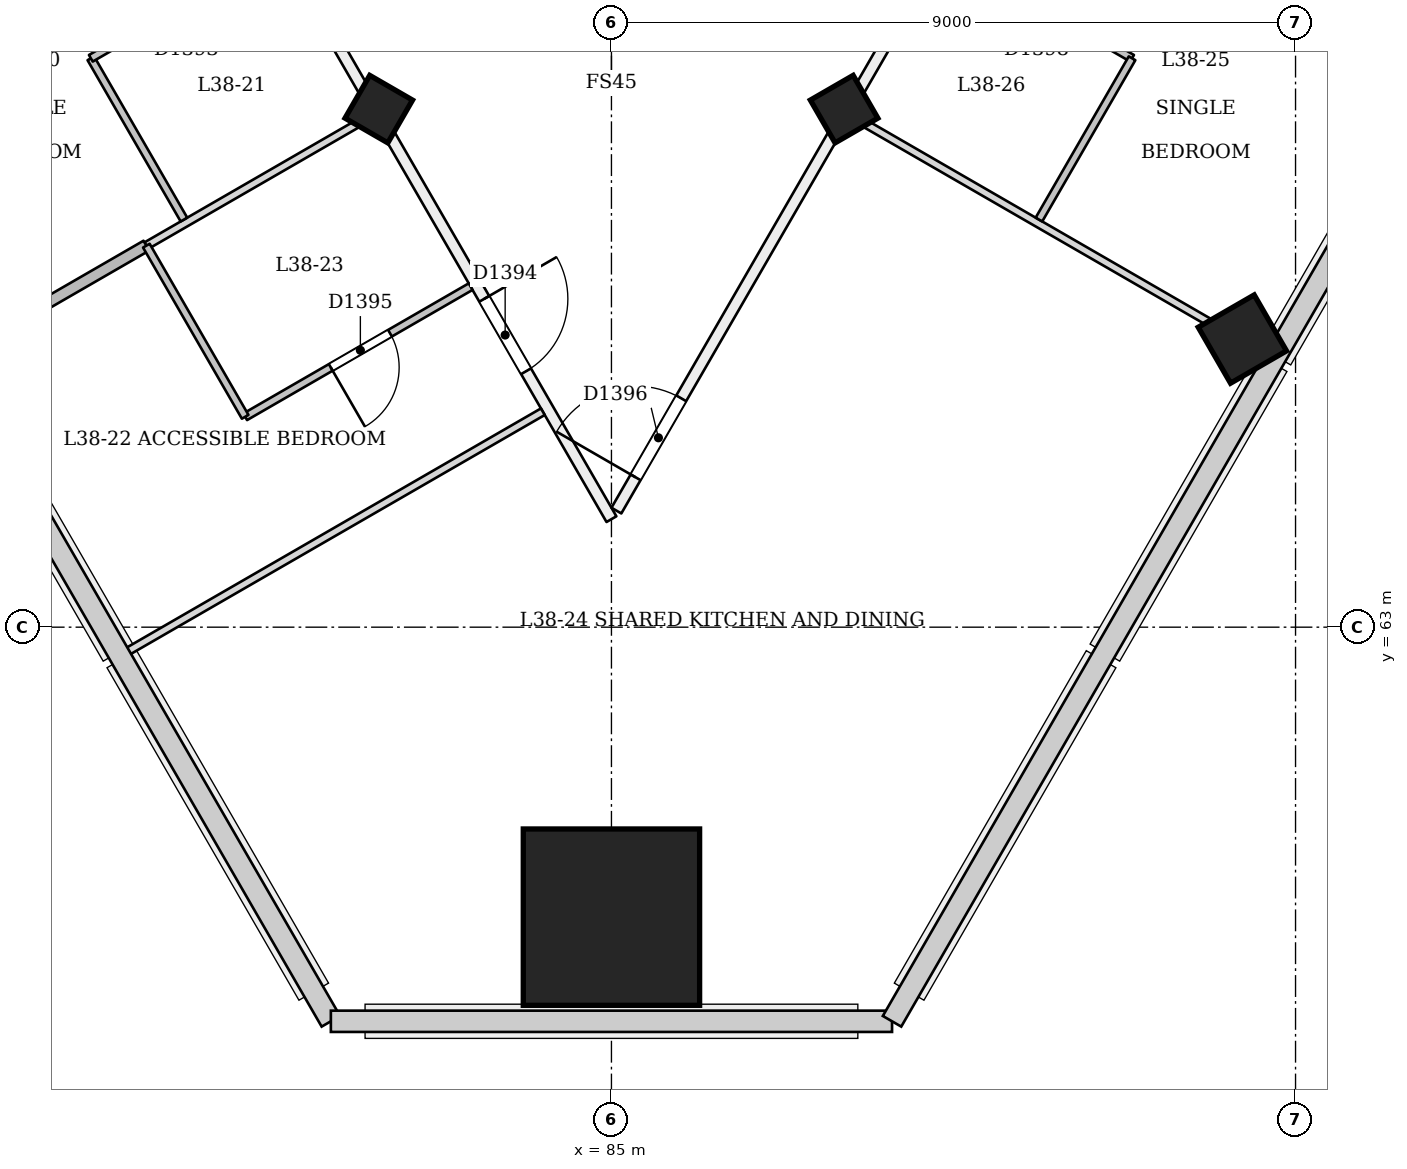
"""IFC4 building model, lengths in metres.
Left out: names, types, materials, properties, quantities, classifications, styles, units other than length and angle.
Written with IfcOpenShell. Run it as: python <this file> out.ifc"""

import sys

from ifc_helpers import new_model, si_unit, direction, frame, frame_2d, origin, origin_2d, place, context, subcontext, project, spatial, rectangle, extrude, element, fill, save


model = new_model("IFC4")
c1 = context("Model", 3, precision=1e-05, world=origin(), true_north=direction((0.0, 1.0)))
c2 = subcontext(c1, "Body", "Model", "MODEL_VIEW")
j1 = project(units=[si_unit("LENGTHUNIT", "METRE"), si_unit("PLANEANGLEUNIT", "RADIAN")], contexts=[c1])
p1 = place(None, origin())
s1 = spatial("IfcSite", under=j1, at=p1, CompositionType="ELEMENT")
p2 = place(p1, origin())
s2 = spatial("IfcBuilding", under=s1, at=p2, CompositionType="ELEMENT")
p3 = place(p2, frame((0.0, 0.0, 149.4)))
s3 = spatial("IfcBuildingStorey", under=s2, at=p3, CompositionType="ELEMENT", Elevation=149.4)
for number, where, z_axis, x_axis in (
    (1, (81.912, 69.769, -0.02), (0.022, 0.038, 0.999), (-0.866, -0.499, 0.038)),
    (2, (88.088, 69.769, -0.02), (-0.022, 0.038, 0.999), (-0.5, -0.866, 0.022)),
):
    element("IfcColumn", number, at=place(p3, frame(where, z_axis=z_axis, x_axis=x_axis)), inside=s3, PredefinedType="COLUMN", context=c2, shape_type="SweptSolid", body=[
        extrude(rectangle(XDim=0.65, YDim=0.65, at=origin_2d()), origin(), (0.0, 0.0, 1.0), 3.604),
    ])
p4 = place(p3, frame((85.0, 59.115, 0.0), z_axis=(0.0, 0.058356907999, 0.998295783467), x_axis=(-1.0, 0.0, 0.0)))
e3 = element("IfcColumn", 3, at=p4, inside=s3, PredefinedType="COLUMN", context=c2, shape_type="SweptSolid", body=[
    extrude(rectangle(XDim=2.32, YDim=2.32, at=origin_2d()), origin(), (0.0, 0.0, 1.0), 3.606),
])
p5 = place(p3, frame((93.328, 66.743, -0.026), z_axis=(-0.022155133694, 0.038483534979, 0.999013597298), x_axis=(-0.5013148803, -0.864980017854, 0.022202691372)))
e4 = element("IfcColumn", 4, at=p5, inside=s3, PredefinedType="COLUMN", context=c2, shape_type="SweptSolid", body=[
    extrude(rectangle(XDim=0.85, YDim=0.85, at=origin_2d()), origin(), (0.0, 0.0, 1.0), 3.604),
])
p6 = place(p3, frame((65.324, 98.5, 0.0), z_axis=(0.0, 0.0, 1.0), x_axis=(0.500001898363, -0.866024307761, 0.0)))
e5 = element("IfcWall", 5, at=p6, inside=s3, PredefinedType="PARTITIONING", context=c2, shape_type="SweptSolid", body=[
    extrude(rectangle(XDim=39.351, YDim=0.15, at=frame_2d((19.675, 0.0))), origin(), (0.0, 0.0, 1.0), 2.75),
])
p7 = place(p6, frame((0.2, 0.0, 0.0)))
e6 = element("IfcOpeningElement", 6, at=p7, cuts=e5, PredefinedType="OPENING", context=c2, shape_type="SweptSolid", body=[
    extrude(rectangle(XDim=1.2, YDim=2.1, at=frame_2d((0.6, 1.05))), frame((0.0, 0.085, 0.0), z_axis=(0.0, -1.0, 0.0), x_axis=(1.0, 0.0, 0.0)), (0.0, 0.0, 1.0), 0.171),
])
p8 = place(p6, frame((3.425, 0.0, 0.0)))
e7 = element("IfcOpeningElement", 7, at=p8, cuts=e5, PredefinedType="OPENING", context=c2, shape_type="SweptSolid", body=[
    extrude(rectangle(XDim=1.0, YDim=2.1, at=frame_2d((0.5, 1.05))), frame((0.0, 0.085, 0.0), z_axis=(0.0, -1.0, 0.0), x_axis=(1.0, 0.0, 0.0)), (0.0, 0.0, 1.0), 0.171),
])
p9 = place(p6, frame((9.004, 0.0, 0.0)))
e8 = element("IfcOpeningElement", 8, at=p9, cuts=e5, PredefinedType="OPENING", context=c2, shape_type="SweptSolid", body=[
    extrude(rectangle(XDim=1.1, YDim=2.1, at=frame_2d((0.55, 1.05))), frame((0.0, 0.085, 0.0), z_axis=(0.0, -1.0, 0.0), x_axis=(1.0, 0.0, 0.0)), (0.0, 0.0, 1.0), 0.171),
])
p10 = place(p6, frame((11.396, 0.0, 0.0)))
e9 = element("IfcOpeningElement", 9, at=p10, cuts=e5, PredefinedType="OPENING", context=c2, shape_type="SweptSolid", body=[
    extrude(rectangle(XDim=1.0, YDim=2.1, at=frame_2d((0.5, 1.05))), frame((0.0, 0.085, 0.0), z_axis=(0.0, -1.0, 0.0), x_axis=(1.0, 0.0, 0.0)), (0.0, 0.0, 1.0), 0.171),
])
p11 = place(p6, frame((17.955, 0.0, 0.0)))
e10 = element("IfcOpeningElement", 10, at=p11, cuts=e5, PredefinedType="OPENING", context=c2, shape_type="SweptSolid", body=[
    extrude(rectangle(XDim=1.0, YDim=2.1, at=frame_2d((0.5, 1.05))), frame((0.0, 0.085, 0.0), z_axis=(0.0, -1.0, 0.0), x_axis=(1.0, 0.0, 0.0)), (0.0, 0.0, 1.0), 0.171),
])
p12 = place(p6, frame((20.396, 0.0, 0.0)))
e11 = element("IfcOpeningElement", 11, at=p12, cuts=e5, PredefinedType="OPENING", context=c2, shape_type="SweptSolid", body=[
    extrude(rectangle(XDim=1.0, YDim=2.1, at=frame_2d((0.5, 1.05))), frame((0.0, 0.085, 0.0), z_axis=(0.0, -1.0, 0.0), x_axis=(1.0, 0.0, 0.0)), (0.0, 0.0, 1.0), 0.171),
])
p13 = place(p6, frame((26.955, 0.0, 0.0)))
e12 = element("IfcOpeningElement", 12, at=p13, cuts=e5, PredefinedType="OPENING", context=c2, shape_type="SweptSolid", body=[
    extrude(rectangle(XDim=1.0, YDim=2.1, at=frame_2d((0.5, 1.05))), frame((0.0, 0.085, 0.0), z_axis=(0.0, -1.0, 0.0), x_axis=(1.0, 0.0, 0.0)), (0.0, 0.0, 1.0), 0.171),
])
p14 = place(p6, frame((29.396, 0.0, 0.0)))
e13 = element("IfcOpeningElement", 13, at=p14, cuts=e5, PredefinedType="OPENING", context=c2, shape_type="SweptSolid", body=[
    extrude(rectangle(XDim=1.0, YDim=2.1, at=frame_2d((0.5, 1.05))), frame((0.0, 0.085, 0.0), z_axis=(0.0, -1.0, 0.0), x_axis=(1.0, 0.0, 0.0)), (0.0, 0.0, 1.0), 0.171),
])
p15 = place(p6, frame((36.004, 0.0, 0.0)))
e14 = element("IfcOpeningElement", 14, at=p15, cuts=e5, PredefinedType="OPENING", context=c2, shape_type="SweptSolid", body=[
    extrude(rectangle(XDim=1.1, YDim=2.1, at=frame_2d((0.55, 1.05))), frame((0.0, 0.085, 0.0), z_axis=(0.0, -1.0, 0.0), x_axis=(1.0, 0.0, 0.0)), (0.0, 0.0, 1.0), 0.171),
])
p16 = place(p3, frame((85.065, 64.534, 0.0), z_axis=(0.0, 0.0, 1.0), x_axis=(0.500002644497, 0.866023876978, 0.0)))
e15 = element("IfcWall", 15, at=p16, inside=s3, PredefinedType="PARTITIONING", context=c2, shape_type="SweptSolid", body=[
    extrude(rectangle(XDim=39.221, YDim=0.15, at=frame_2d((19.61, 0.0))), origin(), (0.0, 0.0, 1.0), 2.75),
])
p17 = place(p16, frame((0.506, 0.0, 0.0)))
e16 = element("IfcOpeningElement", 16, at=p17, cuts=e15, PredefinedType="OPENING", context=c2, shape_type="SweptSolid", body=[
    extrude(rectangle(XDim=1.2, YDim=2.1, at=frame_2d((0.6, 1.05))), frame((0.0, 0.085, 0.0), z_axis=(0.0, -1.0, 0.0), x_axis=(1.0, 0.0, 0.0)), (0.0, 0.0, 1.0), 0.171),
])
p18 = place(p16, frame((8.825, 0.0, 0.0)))
e17 = element("IfcOpeningElement", 17, at=p18, cuts=e15, PredefinedType="OPENING", context=c2, shape_type="SweptSolid", body=[
    extrude(rectangle(XDim=1.0, YDim=2.1, at=frame_2d((0.5, 1.05))), frame((0.0, 0.085, 0.0), z_axis=(0.0, -1.0, 0.0), x_axis=(1.0, 0.0, 0.0)), (0.0, 0.0, 1.0), 0.171),
])
p19 = place(p16, frame((11.266, 0.0, 0.0)))
e18 = element("IfcOpeningElement", 18, at=p19, cuts=e15, PredefinedType="OPENING", context=c2, shape_type="SweptSolid", body=[
    extrude(rectangle(XDim=1.0, YDim=2.1, at=frame_2d((0.5, 1.05))), frame((0.0, 0.085, 0.0), z_axis=(0.0, -1.0, 0.0), x_axis=(1.0, 0.0, 0.0)), (0.0, 0.0, 1.0), 0.171),
])
p20 = place(p16, frame((17.825, 0.0, 0.0)))
e19 = element("IfcOpeningElement", 19, at=p20, cuts=e15, PredefinedType="OPENING", context=c2, shape_type="SweptSolid", body=[
    extrude(rectangle(XDim=1.0, YDim=2.1, at=frame_2d((0.5, 1.05))), frame((0.0, 0.085, 0.0), z_axis=(0.0, -1.0, 0.0), x_axis=(1.0, 0.0, 0.0)), (0.0, 0.0, 1.0), 0.171),
])
p21 = place(p16, frame((20.266, 0.0, 0.0)))
e20 = element("IfcOpeningElement", 20, at=p21, cuts=e15, PredefinedType="OPENING", context=c2, shape_type="SweptSolid", body=[
    extrude(rectangle(XDim=1.0, YDim=2.1, at=frame_2d((0.5, 1.05))), frame((0.0, 0.085, 0.0), z_axis=(0.0, -1.0, 0.0), x_axis=(1.0, 0.0, 0.0)), (0.0, 0.0, 1.0), 0.171),
])
p22 = place(p16, frame((26.825, 0.0, 0.0)))
e21 = element("IfcOpeningElement", 21, at=p22, cuts=e15, PredefinedType="OPENING", context=c2, shape_type="SweptSolid", body=[
    extrude(rectangle(XDim=1.0, YDim=2.1, at=frame_2d((0.5, 1.05))), frame((0.0, 0.085, 0.0), z_axis=(0.0, -1.0, 0.0), x_axis=(1.0, 0.0, 0.0)), (0.0, 0.0, 1.0), 0.171),
])
p23 = place(p16, frame((30.296, 0.0, 0.0)))
e22 = element("IfcOpeningElement", 22, at=p23, cuts=e15, PredefinedType="OPENING", context=c2, shape_type="SweptSolid", body=[
    extrude(rectangle(XDim=1.0, YDim=2.1, at=frame_2d((0.5, 1.05))), frame((0.0, 0.085, 0.0), z_axis=(0.0, -1.0, 0.0), x_axis=(1.0, 0.0, 0.0)), (0.0, 0.0, 1.0), 0.171),
])
p24 = place(p16, frame((35.875, 0.0, 0.0)))
e23 = element("IfcOpeningElement", 23, at=p24, cuts=e15, PredefinedType="OPENING", context=c2, shape_type="SweptSolid", body=[
    extrude(rectangle(XDim=1.1, YDim=2.1, at=frame_2d((0.55, 1.05))), frame((0.0, 0.085, 0.0), z_axis=(0.0, -1.0, 0.0), x_axis=(1.0, 0.0, 0.0)), (0.0, 0.0, 1.0), 0.171),
])
p25 = place(p16, frame((37.821, 0.0, 0.0)))
e24 = element("IfcOpeningElement", 24, at=p25, cuts=e15, PredefinedType="OPENING", context=c2, shape_type="SweptSolid", body=[
    extrude(rectangle(XDim=1.2, YDim=2.1, at=frame_2d((0.6, 1.05))), frame((0.0, 0.085, 0.0), z_axis=(0.0, -1.0, 0.0), x_axis=(1.0, 0.0, 0.0)), (0.0, 0.0, 1.0), 0.171),
])
p26 = place(p3, frame((74.102, 70.456, 0.0), z_axis=(0.0, 0.0, 1.0), x_axis=(0.866025401434, 0.500000004071, 0.0)))
e25 = element("IfcWall", 25, at=p26, inside=s3, PredefinedType="PARTITIONING", context=c2, shape_type="SweptSolid", body=[
    extrude(rectangle(XDim=6.345, YDim=0.15, at=frame_2d((3.173, 0.0))), origin(), (0.0, 0.0, 1.0), 2.65),
])
p27 = place(p3, frame((79.376, 68.363, 0.0), z_axis=(0.0, 0.0, 1.0), x_axis=(-0.499943856944, 0.866057815567, 0.0)))
e26 = element("IfcWall", 26, at=p27, inside=s3, PredefinedType="PARTITIONING", context=c2, shape_type="SweptSolid", body=[
    extrude(rectangle(XDim=2.45, YDim=0.1, at=frame_2d((1.225, 0.0))), origin(), (0.0, 0.0, 1.0), 2.75),
])
p28 = place(p3, frame((78.151, 70.484, 0.0), z_axis=(0.0, 0.0, 1.0), x_axis=(0.866048868473, 0.499959355765, 0.0)))
e27 = element("IfcWall", 27, at=p28, inside=s3, PredefinedType="PARTITIONING", context=c2, shape_type="SweptSolid", body=[
    extrude(rectangle(XDim=2.825, YDim=0.1, at=frame_2d((1.413, 0.0))), origin(), (0.0, 0.0, 1.0), 3.15),
])
p29 = place(p28, frame((1.0, 0.0, 0.0)))
e28 = element("IfcOpeningElement", 28, at=p29, cuts=e27, PredefinedType="OPENING", context=c2, shape_type="SweptSolid", body=[
    extrude(rectangle(XDim=0.9, YDim=2.1, at=frame_2d((0.45, 1.05))), frame((0.0, 0.061, 0.0), z_axis=(0.0, -1.0, 0.0), x_axis=(1.0, 0.0, 0.0)), (0.0, 0.0, 1.0), 0.121),
])
p30 = place(p3, frame((76.37, 66.569, 0.0), z_axis=(0.0, 0.0, 1.0), x_axis=(0.866032775405, 0.499987231761, 0.0)))
e29 = element("IfcWall", 29, at=p30, inside=s3, PredefinedType="PARTITIONING", context=c2, shape_type="SweptSolid", body=[
    extrude(rectangle(XDim=2.9, YDim=0.15, at=frame_2d((1.45, 0.0))), origin(), (0.0, 0.0, 1.0), 2.65),
])
p31 = place(p3, frame((78.881, 68.019, 0.0), z_axis=(0.0, 0.0, 1.0), x_axis=(0.866050272892, 0.499956922968, 0.0)))
e30 = element("IfcWall", 30, at=p31, inside=s3, PredefinedType="PARTITIONING", context=c2, shape_type="SweptSolid", body=[
    extrude(rectangle(XDim=3.425, YDim=0.1, at=frame_2d((1.712, 0.0))), origin(), (0.0, 0.0, 1.0), 2.75),
])
p32 = place(p3, frame((83.147, 67.48, 0.0), z_axis=(0.0, 0.0, 1.0), x_axis=(-0.866032454348, -0.499987787867, 0.0)))
e31 = element("IfcWall", 31, at=p32, inside=s3, PredefinedType="PARTITIONING", context=c2, shape_type="SweptSolid", body=[
    extrude(rectangle(XDim=3.425, YDim=0.1, at=frame_2d((1.712, 0.0))), origin(), (0.0, 0.0, 1.0), 3.15),
])
p33 = place(p32, frame((1.225, 0.0, 0.0)))
e32 = element("IfcOpeningElement", 32, at=p33, cuts=e31, PredefinedType="OPENING", context=c2, shape_type="SweptSolid", body=[
    extrude(rectangle(XDim=0.9, YDim=2.1, at=frame_2d((0.45, 1.05))), frame((0.0, 0.061, 0.0), z_axis=(0.0, -1.0, 0.0), x_axis=(1.0, 0.0, 0.0)), (0.0, 0.0, 1.0), 0.121),
])
p34 = place(p3, frame((80.181, 65.768, 0.0), z_axis=(0.0, 0.0, 1.0), x_axis=(-0.500006934395, 0.866021400173, 0.0)))
e33 = element("IfcWall", 33, at=p34, inside=s3, PredefinedType="PARTITIONING", context=c2, shape_type="SweptSolid", body=[
    extrude(rectangle(XDim=2.6, YDim=0.1, at=frame_2d((1.3, 0.0))), origin(), (0.0, 0.0, 1.0), 2.75),
])
p35 = place(p3, frame((78.602, 62.662, 0.0), z_axis=(0.0, 0.0, 1.0), x_axis=(0.866025401434, 0.500000004071, 0.0)))
e34 = element("IfcWall", 34, at=p35, inside=s3, PredefinedType="PARTITIONING", context=c2, shape_type="SweptSolid", body=[
    extrude(rectangle(XDim=6.345, YDim=0.1, at=frame_2d((3.173, 0.0))), origin(), (0.0, 0.0, 1.0), 2.65),
])
p36 = place(p3, frame((93.63, 66.569, 0.0), z_axis=(0.0, 0.0, 1.0), x_axis=(-0.866042250622, 0.499970819286, 0.0)))
e35 = element("IfcWall", 35, at=p36, inside=s3, PredefinedType="PARTITIONING", context=c2, shape_type="SweptSolid", body=[
    extrude(rectangle(XDim=6.325, YDim=0.1, at=frame_2d((3.163, 0.0))), origin(), (0.0, 0.0, 1.0), 2.65),
])
p37 = place(p3, frame((89.403, 71.897, 0.0), z_axis=(0.0, 0.0, 1.0), x_axis=(0.866048868473, -0.499959355765, 0.0)))
e36 = element("IfcWall", 36, at=p37, inside=s3, PredefinedType="PARTITIONING", context=c2, shape_type="SweptSolid", body=[
    extrude(rectangle(XDim=2.825, YDim=0.1, at=frame_2d((1.413, 0.0))), origin(), (0.0, 0.0, 1.0), 3.15),
])
p38 = place(p37, frame((0.925, 0.0, 0.0)))
e37 = element("IfcOpeningElement", 37, at=p38, cuts=e36, PredefinedType="OPENING", context=c2, shape_type="SweptSolid", body=[
    extrude(rectangle(XDim=0.9, YDim=2.1, at=frame_2d((0.45, 1.05))), frame((0.0, 0.061, 0.0), z_axis=(0.0, -1.0, 0.0), x_axis=(1.0, 0.0, 0.0)), (0.0, 0.0, 1.0), 0.121),
])
p39 = place(p3, frame((91.849, 70.484, 0.0), z_axis=(0.0, 0.0, 1.0), x_axis=(-0.499943856944, -0.866057815567, 0.0)))
e38 = element("IfcWall", 38, at=p39, inside=s3, PredefinedType="PARTITIONING", context=c2, shape_type="SweptSolid", body=[
    extrude(rectangle(XDim=2.45, YDim=0.1, at=frame_2d((1.225, 0.0))), origin(), (0.0, 0.0, 1.0), 2.75),
])
p40 = place(p3, frame((95.898, 70.456, 0.0), z_axis=(0.0, 0.0, 1.0), x_axis=(-0.866025401434, 0.500000004071, 0.0)))
e39 = element("IfcWall", 39, at=p40, inside=s3, PredefinedType="PARTITIONING", context=c2, shape_type="SweptSolid", body=[
    extrude(rectangle(XDim=6.345, YDim=0.15, at=frame_2d((3.173, 0.0))), origin(), (0.0, 0.0, 1.0), 2.65),
])
p41 = place(p15, origin())
e40 = element("IfcDoor", 40, at=p41, inside=s3, OperationType="SINGLE_SWING_LEFT", PredefinedType="NOTDEFINED", context=c2, shape_type="SweptSolid", body=[
    extrude(rectangle(XDim=1.1, YDim=2.1, at=frame_2d((0.55, 1.05))), frame((0.0, 0.025, 0.0), z_axis=(0.0, -1.0, 0.0), x_axis=(1.0, 0.0, 0.0)), (0.0, 0.0, 1.0), 0.05),
])
fill(e14, e40)
p42 = place(p33, origin())
e41 = element("IfcDoor", 41, at=p42, inside=s3, OperationType="SINGLE_SWING_RIGHT", PredefinedType="NOTDEFINED", context=c2, shape_type="SweptSolid", body=[
    extrude(rectangle(XDim=0.9, YDim=2.1, at=frame_2d((0.45, 1.05))), frame((0.0, 0.025, 0.0), z_axis=(0.0, -1.0, 0.0), x_axis=(1.0, 0.0, 0.0)), (0.0, 0.0, 1.0), 0.05),
])
fill(e32, e41)
p43 = place(p17, origin())
e42 = element("IfcDoor", 42, at=p43, inside=s3, OperationType="SINGLE_SWING_LEFT", PredefinedType="NOTDEFINED", context=c2, shape_type="SweptSolid", body=[
    extrude(rectangle(XDim=1.2, YDim=2.1, at=frame_2d((0.6, 1.05))), frame((0.0, 0.025, 0.0), z_axis=(0.0, -1.0, 0.0), x_axis=(1.0, 0.0, 0.0)), (0.0, 0.0, 1.0), 0.05),
])
fill(e16, e42)
save(model, sys.argv[1])
